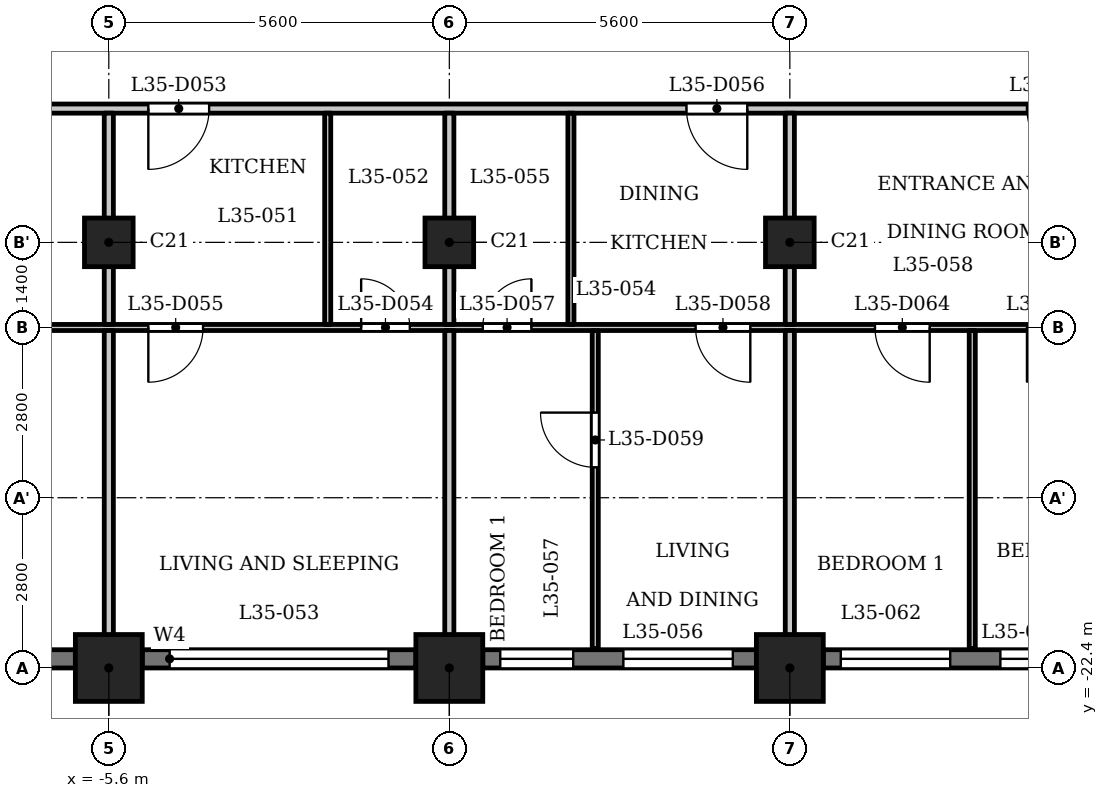
"""IFC4 building model, lengths in metres.
Left out: names, types, materials, properties, quantities, classifications, styles, units other than length and angle.
Written with IfcOpenShell. Run it as: python <this file> out.ifc"""

import sys

from ifc_helpers import new_model, si_unit, direction, frame, frame_2d, origin, origin_2d, place, context, subcontext, project, spatial, rectangle, extrude, element, fill, save


model = new_model("IFC4")
c1 = context("Model", 3, precision=1e-05, world=origin(), true_north=direction((0.0, 1.0)))
c2 = subcontext(c1, "Body", "Model", "MODEL_VIEW")
j1 = project(units=[si_unit("LENGTHUNIT", "METRE"), si_unit("PLANEANGLEUNIT", "RADIAN")], contexts=[c1])
p1 = place(None, origin())
s1 = spatial("IfcSite", under=j1, at=p1, CompositionType="ELEMENT")
p2 = place(p1, origin())
s2 = spatial("IfcBuilding", under=s1, at=p2, CompositionType="ELEMENT")
p3 = place(p2, frame((0.0, 0.0, 139.6)))
s3 = spatial("IfcBuildingStorey", under=s2, at=p3, CompositionType="ELEMENT", Elevation=139.6)
for number, where, z_axis, x_axis in (
    (1, (-5.6, -22.4, 0.0), (0.0, 0.0, 1.0), (1.0, 0.0, 0.0)),
    (2, (0.0, -22.4, 0.0), (0.0, 0.0, 1.0), (1.0, 0.0, 0.0)),
    (3, (5.6, -22.4, 0.0), (0.0, 0.0, 1.0), (1.0, 0.0, 0.0)),
):
    element("IfcColumn", number, at=place(p3, frame(where, z_axis=z_axis, x_axis=x_axis)), inside=s3, PredefinedType="COLUMN", context=c2, shape_type="SweptSolid", body=[
        extrude(rectangle(XDim=1.1, YDim=1.1, at=origin_2d()), origin(), (0.0, 0.0, 1.0), 3.5),
    ])
for number, where, z_axis, x_axis in (
    (4, (-5.6, -15.4, 0.0), (0.0, 0.0, 1.0), (1.0, 0.0, 0.0)),
    (5, (0.0, -15.4, 0.0), (0.0, 0.0, 1.0), (1.0, 0.0, 0.0)),
    (6, (5.6, -15.4, 0.0), (0.0, 0.0, 1.0), (1.0, 0.0, 0.0)),
):
    element("IfcColumn", number, at=place(p3, frame(where, z_axis=z_axis, x_axis=x_axis)), inside=s3, PredefinedType="COLUMN", context=c2, shape_type="SweptSolid", body=[
        extrude(rectangle(XDim=0.8, YDim=0.8, at=origin_2d()), origin(), (0.0, 0.0, 1.0), 3.5),
    ])
p4 = place(p3, frame((-10.65, -22.25, 0.0), z_axis=(0.0, 0.0, 1.0), x_axis=(1.0, 0.0, 0.0)))
e7 = element("IfcWall", 7, at=p4, inside=s3, PredefinedType="SOLIDWALL", context=c2, shape_type="SweptSolid", body=[
    extrude(rectangle(XDim=4.5, YDim=0.3, at=frame_2d((2.25, 0.0))), origin(), (0.0, 0.0, 1.0), 2.45),
])
p5 = place(p4, frame((0.45, 0.0, 1.2)))
e8 = element("IfcOpeningElement", 8, at=p5, cuts=e7, PredefinedType="OPENING", context=c2, shape_type="SweptSolid", body=[
    extrude(rectangle(XDim=3.6, YDim=0.95, at=frame_2d((1.8, 0.475))), frame((0.0, 0.16, 0.0), z_axis=(0.0, -1.0, 0.0), x_axis=(1.0, 0.0, 0.0)), (0.0, 0.0, 1.0), 0.32),
])
p6 = place(p3, frame((-5.05, -22.25, 0.0), z_axis=(0.0, 0.0, 1.0), x_axis=(1.0, 0.0, 0.0)))
e9 = element("IfcWall", 9, at=p6, inside=s3, PredefinedType="SOLIDWALL", context=c2, shape_type="SweptSolid", body=[
    extrude(rectangle(XDim=4.5, YDim=0.3, at=frame_2d((2.25, 0.0))), origin(), (0.0, 0.0, 1.0), 2.45),
])
p7 = place(p6, frame((0.45, 0.0, 1.2)))
e10 = element("IfcOpeningElement", 10, at=p7, cuts=e9, PredefinedType="OPENING", context=c2, shape_type="SweptSolid", body=[
    extrude(rectangle(XDim=3.6, YDim=0.95, at=frame_2d((1.8, 0.475))), frame((0.0, 0.16, 0.0), z_axis=(0.0, -1.0, 0.0), x_axis=(1.0, 0.0, 0.0)), (0.0, 0.0, 1.0), 0.32),
])
p8 = place(p3, frame((0.55, -22.25, 0.0), z_axis=(0.0, 0.0, 1.0), x_axis=(1.0, 0.0, 0.0)))
e11 = element("IfcWall", 11, at=p8, inside=s3, PredefinedType="SOLIDWALL", context=c2, shape_type="SweptSolid", body=[
    extrude(rectangle(XDim=4.5, YDim=0.3, at=frame_2d((2.25, 0.0))), origin(), (0.0, 0.0, 1.0), 2.45),
])
p9 = place(p8, frame((0.288, 0.0, 0.6)))
e12 = element("IfcOpeningElement", 12, at=p9, cuts=e11, PredefinedType="OPENING", context=c2, shape_type="SweptSolid", body=[
    extrude(rectangle(XDim=1.2, YDim=1.55, at=frame_2d((0.6, 0.775))), frame((0.0, 0.16, 0.0), z_axis=(0.0, -1.0, 0.0), x_axis=(1.0, 0.0, 0.0)), (0.0, 0.0, 1.0), 0.32),
])
p10 = place(p8, frame((2.312, 0.0, 0.9)))
e13 = element("IfcOpeningElement", 13, at=p10, cuts=e11, PredefinedType="OPENING", context=c2, shape_type="SweptSolid", body=[
    extrude(rectangle(XDim=1.8, YDim=1.25, at=frame_2d((0.9, 0.625))), frame((0.0, 0.16, 0.0), z_axis=(0.0, -1.0, 0.0), x_axis=(1.0, 0.0, 0.0)), (0.0, 0.0, 1.0), 0.32),
])
p11 = place(p3, frame((6.15, -22.25, 0.0), z_axis=(0.0, 0.0, 1.0), x_axis=(1.0, 0.0, 0.0)))
e14 = element("IfcWall", 14, at=p11, inside=s3, PredefinedType="SOLIDWALL", context=c2, shape_type="SweptSolid", body=[
    extrude(rectangle(XDim=4.5, YDim=0.3, at=frame_2d((2.25, 0.0))), origin(), (0.0, 0.0, 1.0), 2.45),
])
p12 = place(p11, frame((0.288, 0.0, 0.9)))
e15 = element("IfcOpeningElement", 15, at=p12, cuts=e14, PredefinedType="OPENING", context=c2, shape_type="SweptSolid", body=[
    extrude(rectangle(XDim=1.8, YDim=1.25, at=frame_2d((0.9, 0.625))), frame((0.0, 0.16, 0.0), z_axis=(0.0, -1.0, 0.0), x_axis=(1.0, 0.0, 0.0)), (0.0, 0.0, 1.0), 0.32),
])
p13 = place(p11, frame((2.913, 0.0, 0.6)))
e16 = element("IfcOpeningElement", 16, at=p13, cuts=e14, PredefinedType="OPENING", context=c2, shape_type="SweptSolid", body=[
    extrude(rectangle(XDim=1.2, YDim=1.55, at=frame_2d((0.6, 0.775))), frame((0.0, 0.16, 0.0), z_axis=(0.0, -1.0, 0.0), x_axis=(1.0, 0.0, 0.0)), (0.0, 0.0, 1.0), 0.32),
])
p14 = place(p3, frame((-16.725, -16.8, 0.0), z_axis=(0.0, 0.0, 1.0), x_axis=(1.0, 0.0, 0.0)))
e17 = element("IfcWall", 17, at=p14, inside=s3, PredefinedType="PARTITIONING", context=c2, shape_type="SweptSolid", body=[
    extrude(rectangle(XDim=33.45, YDim=0.1, at=frame_2d((16.725, 0.0))), origin(), (0.0, 0.0, 1.0), 3.2),
])
p15 = place(p14, frame((0.575, 0.0, 0.0)))
e18 = element("IfcOpeningElement", 18, at=p15, cuts=e17, PredefinedType="OPENING", context=c2, shape_type="SweptSolid", body=[
    extrude(rectangle(XDim=0.8, YDim=2.1, at=frame_2d((0.4, 1.05))), frame((0.0, 0.06, 0.0), z_axis=(0.0, -1.0, 0.0), x_axis=(1.0, 0.0, 0.0)), (0.0, 0.0, 1.0), 0.12),
])
p16 = place(p14, frame((6.175, 0.0, 0.0)))
e19 = element("IfcOpeningElement", 19, at=p16, cuts=e17, PredefinedType="OPENING", context=c2, shape_type="SweptSolid", body=[
    extrude(rectangle(XDim=0.9, YDim=2.1, at=frame_2d((0.45, 1.05))), frame((0.0, 0.06, 0.0), z_axis=(0.0, -1.0, 0.0), x_axis=(1.0, 0.0, 0.0)), (0.0, 0.0, 1.0), 0.12),
])
p17 = place(p14, frame((15.275, 0.0, 0.0)))
e20 = element("IfcOpeningElement", 20, at=p17, cuts=e17, PredefinedType="OPENING", context=c2, shape_type="SweptSolid", body=[
    extrude(rectangle(XDim=0.8, YDim=2.1, at=frame_2d((0.4, 1.05))), frame((0.0, 0.06, 0.0), z_axis=(0.0, -1.0, 0.0), x_axis=(1.0, 0.0, 0.0)), (0.0, 0.0, 1.0), 0.12),
])
p18 = place(p14, frame((11.775, 0.0, 0.0)))
e21 = element("IfcOpeningElement", 21, at=p18, cuts=e17, PredefinedType="OPENING", context=c2, shape_type="SweptSolid", body=[
    extrude(rectangle(XDim=0.9, YDim=2.1, at=frame_2d((0.45, 1.05))), frame((0.0, 0.06, 0.0), z_axis=(0.0, -1.0, 0.0), x_axis=(1.0, 0.0, 0.0)), (0.0, 0.0, 1.0), 0.12),
])
p19 = place(p14, frame((17.275, 0.0, 0.0)))
e22 = element("IfcOpeningElement", 22, at=p19, cuts=e17, PredefinedType="OPENING", context=c2, shape_type="SweptSolid", body=[
    extrude(rectangle(XDim=0.8, YDim=2.1, at=frame_2d((0.4, 1.05))), frame((0.0, 0.06, 0.0), z_axis=(0.0, -1.0, 0.0), x_axis=(1.0, 0.0, 0.0)), (0.0, 0.0, 1.0), 0.12),
])
p20 = place(p14, frame((20.775, 0.0, 0.0)))
e23 = element("IfcOpeningElement", 23, at=p20, cuts=e17, PredefinedType="OPENING", context=c2, shape_type="SweptSolid", body=[
    extrude(rectangle(XDim=0.9, YDim=2.1, at=frame_2d((0.45, 1.05))), frame((0.0, 0.06, 0.0), z_axis=(0.0, -1.0, 0.0), x_axis=(1.0, 0.0, 0.0)), (0.0, 0.0, 1.0), 0.12),
])
p21 = place(p14, frame((31.575, 0.0, 0.0)))
e24 = element("IfcOpeningElement", 24, at=p21, cuts=e17, PredefinedType="OPENING", context=c2, shape_type="SweptSolid", body=[
    extrude(rectangle(XDim=0.8, YDim=2.1, at=frame_2d((0.4, 1.05))), frame((0.0, 0.06, 0.0), z_axis=(0.0, -1.0, 0.0), x_axis=(1.0, 0.0, 0.0)), (0.0, 0.0, 1.0), 0.12),
])
p22 = place(p14, frame((28.575, 0.0, 0.0)))
e25 = element("IfcOpeningElement", 25, at=p22, cuts=e17, PredefinedType="OPENING", context=c2, shape_type="SweptSolid", body=[
    extrude(rectangle(XDim=0.9, YDim=2.1, at=frame_2d((0.45, 1.05))), frame((0.0, 0.06, 0.0), z_axis=(0.0, -1.0, 0.0), x_axis=(1.0, 0.0, 0.0)), (0.0, 0.0, 1.0), 0.12),
])
p23 = place(p14, frame((23.725, 0.0, 0.0)))
e26 = element("IfcOpeningElement", 26, at=p23, cuts=e17, PredefinedType="OPENING", context=c2, shape_type="SweptSolid", body=[
    extrude(rectangle(XDim=0.9, YDim=2.1, at=frame_2d((0.45, 1.05))), frame((0.0, 0.06, 0.0), z_axis=(0.0, -1.0, 0.0), x_axis=(1.0, 0.0, 0.0)), (0.0, 0.0, 1.0), 0.12),
])
p24 = place(p14, frame((26.225, 0.0, 0.0)))
e27 = element("IfcOpeningElement", 27, at=p24, cuts=e17, PredefinedType="OPENING", context=c2, shape_type="SweptSolid", body=[
    extrude(rectangle(XDim=0.9, YDim=2.1, at=frame_2d((0.45, 1.05))), frame((0.0, 0.06, 0.0), z_axis=(0.0, -1.0, 0.0), x_axis=(1.0, 0.0, 0.0)), (0.0, 0.0, 1.0), 0.12),
])
p25 = place(p3, frame((-17.4, -13.2, 0.0), z_axis=(0.0, 0.0, 1.0), x_axis=(1.0, 0.0, 0.0)))
e28 = element("IfcWall", 28, at=p25, inside=s3, PredefinedType="PARTITIONING", context=c2, shape_type="SweptSolid", body=[
    extrude(rectangle(XDim=34.8, YDim=0.15, at=frame_2d((17.4, 0.0))), origin(), (0.0, 0.0, 1.0), 3.2),
])
p26 = place(p25, frame((0.15, 0.0, 0.0)))
e29 = element("IfcOpeningElement", 29, at=p26, cuts=e28, PredefinedType="OPENING", context=c2, shape_type="SweptSolid", body=[
    extrude(rectangle(XDim=1.0, YDim=2.1, at=frame_2d((0.5, 1.05))), frame((0.0, 0.085, 0.0), z_axis=(0.0, -1.0, 0.0), x_axis=(1.0, 0.0, 0.0)), (0.0, 0.0, 1.0), 0.17),
])
p27 = place(p25, frame((33.55, 0.0, 0.0)))
e30 = element("IfcOpeningElement", 30, at=p27, cuts=e28, PredefinedType="OPENING", context=c2, shape_type="SweptSolid", body=[
    extrude(rectangle(XDim=1.0, YDim=2.1, at=frame_2d((0.5, 1.05))), frame((0.0, 0.085, 0.0), z_axis=(0.0, -1.0, 0.0), x_axis=(1.0, 0.0, 0.0)), (0.0, 0.0, 1.0), 0.17),
])
p28 = place(p25, frame((6.85, 0.0, 0.0)))
e31 = element("IfcOpeningElement", 31, at=p28, cuts=e28, PredefinedType="OPENING", context=c2, shape_type="SweptSolid", body=[
    extrude(rectangle(XDim=1.0, YDim=2.1, at=frame_2d((0.5, 1.05))), frame((0.0, 0.085, 0.0), z_axis=(0.0, -1.0, 0.0), x_axis=(1.0, 0.0, 0.0)), (0.0, 0.0, 1.0), 0.17),
])
p29 = place(p25, frame((12.45, 0.0, 0.0)))
e32 = element("IfcOpeningElement", 32, at=p29, cuts=e28, PredefinedType="OPENING", context=c2, shape_type="SweptSolid", body=[
    extrude(rectangle(XDim=1.0, YDim=2.1, at=frame_2d((0.5, 1.05))), frame((0.0, 0.085, 0.0), z_axis=(0.0, -1.0, 0.0), x_axis=(1.0, 0.0, 0.0)), (0.0, 0.0, 1.0), 0.17),
])
p30 = place(p25, frame((21.3, 0.0, 0.0)))
e33 = element("IfcOpeningElement", 33, at=p30, cuts=e28, PredefinedType="OPENING", context=c2, shape_type="SweptSolid", body=[
    extrude(rectangle(XDim=1.0, YDim=2.1, at=frame_2d((0.5, 1.05))), frame((0.0, 0.085, 0.0), z_axis=(0.0, -1.0, 0.0), x_axis=(1.0, 0.0, 0.0)), (0.0, 0.0, 1.0), 0.17),
])
p31 = place(p25, frame((26.9, 0.0, 0.0)))
e34 = element("IfcOpeningElement", 34, at=p31, cuts=e28, PredefinedType="OPENING", context=c2, shape_type="SweptSolid", body=[
    extrude(rectangle(XDim=1.0, YDim=2.1, at=frame_2d((0.5, 1.05))), frame((0.0, 0.085, 0.0), z_axis=(0.0, -1.0, 0.0), x_axis=(1.0, 0.0, 0.0)), (0.0, 0.0, 1.0), 0.17),
])
p32 = place(p3, frame((-5.6, -22.93, 0.0), z_axis=(0.0, 0.0, 1.0), x_axis=(0.0, 1.0, 0.0)))
e35 = element("IfcWall", 35, at=p32, inside=s3, PredefinedType="PARTITIONING", context=c2, shape_type="SweptSolid", body=[
    extrude(rectangle(XDim=6.08, YDim=0.15, at=frame_2d((3.04, 0.0))), origin(), (0.0, 0.0, 1.0), 3.2),
])
p33 = place(p3, frame((-5.6, -16.75, 0.0), z_axis=(0.0, 0.0, 1.0), x_axis=(0.0, 1.0, 0.0)))
e36 = element("IfcWall", 36, at=p33, inside=s3, PredefinedType="PARTITIONING", context=c2, shape_type="SweptSolid", body=[
    extrude(rectangle(XDim=3.475, YDim=0.15, at=frame_2d((1.738, 0.0))), origin(), (0.0, 0.0, 1.0), 3.2),
])
p34 = place(p3, frame((-2.0, -16.75, 0.0), z_axis=(0.0, 0.0, 1.0), x_axis=(0.0, 1.0, 0.0)))
e37 = element("IfcWall", 37, at=p34, inside=s3, PredefinedType="PARTITIONING", context=c2, shape_type="SweptSolid", body=[
    extrude(rectangle(XDim=3.475, YDim=0.1, at=frame_2d((1.738, 0.0))), origin(), (0.0, 0.0, 1.0), 3.2),
])
p35 = place(p3, frame((0.0, -22.93, 0.0), z_axis=(0.0, 0.0, 1.0), x_axis=(0.0, 1.0, 0.0)))
e38 = element("IfcWall", 38, at=p35, inside=s3, PredefinedType="PARTITIONING", context=c2, shape_type="SweptSolid", body=[
    extrude(rectangle(XDim=6.08, YDim=0.15, at=frame_2d((3.04, 0.0))), origin(), (0.0, 0.0, 1.0), 3.2),
])
p36 = place(p3, frame((0.0, -16.75, 0.0), z_axis=(0.0, 0.0, 1.0), x_axis=(0.0, 1.0, 0.0)))
e39 = element("IfcWall", 39, at=p36, inside=s3, PredefinedType="PARTITIONING", context=c2, shape_type="SweptSolid", body=[
    extrude(rectangle(XDim=3.475, YDim=0.15, at=frame_2d((1.738, 0.0))), origin(), (0.0, 0.0, 1.0), 3.2),
])
p37 = place(p3, frame((2.0, -16.75, 0.0), z_axis=(0.0, 0.0, 1.0), x_axis=(0.0, 1.0, 0.0)))
e40 = element("IfcWall", 40, at=p37, inside=s3, PredefinedType="PARTITIONING", context=c2, shape_type="SweptSolid", body=[
    extrude(rectangle(XDim=3.475, YDim=0.1, at=frame_2d((1.738, 0.0))), origin(), (0.0, 0.0, 1.0), 3.2),
])
p38 = place(p3, frame((2.4, -22.08, 0.0), z_axis=(0.0, 0.0, 1.0), x_axis=(0.0, 1.0, 0.0)))
e41 = element("IfcWall", 41, at=p38, inside=s3, PredefinedType="PARTITIONING", context=c2, shape_type="SweptSolid", body=[
    extrude(rectangle(XDim=5.23, YDim=0.1, at=frame_2d((2.615, 0.0))), origin(), (0.0, 0.0, 1.0), 3.2),
])
p39 = place(p38, frame((2.98, 0.0, 0.0)))
e42 = element("IfcOpeningElement", 42, at=p39, cuts=e41, PredefinedType="OPENING", context=c2, shape_type="SweptSolid", body=[
    extrude(rectangle(XDim=0.9, YDim=2.1, at=frame_2d((0.45, 1.05))), frame((0.0, 0.06, 0.0), z_axis=(0.0, -1.0, 0.0), x_axis=(1.0, 0.0, 0.0)), (0.0, 0.0, 1.0), 0.12),
])
p40 = place(p3, frame((5.6, -22.93, 0.0), z_axis=(0.0, 0.0, 1.0), x_axis=(0.0, 1.0, 0.0)))
e43 = element("IfcWall", 43, at=p40, inside=s3, PredefinedType="PARTITIONING", context=c2, shape_type="SweptSolid", body=[
    extrude(rectangle(XDim=6.08, YDim=0.15, at=frame_2d((3.04, 0.0))), origin(), (0.0, 0.0, 1.0), 3.2),
])
p41 = place(p3, frame((5.6, -16.75, 0.0), z_axis=(0.0, 0.0, 1.0), x_axis=(0.0, 1.0, 0.0)))
e44 = element("IfcWall", 44, at=p41, inside=s3, PredefinedType="PARTITIONING", context=c2, shape_type="SweptSolid", body=[
    extrude(rectangle(XDim=3.475, YDim=0.15, at=frame_2d((1.738, 0.0))), origin(), (0.0, 0.0, 1.0), 3.2),
])
p42 = place(p3, frame((8.6, -22.08, 0.0), z_axis=(0.0, 0.0, 1.0), x_axis=(0.0, 1.0, 0.0)))
e45 = element("IfcWall", 45, at=p42, inside=s3, PredefinedType="PARTITIONING", context=c2, shape_type="SweptSolid", body=[
    extrude(rectangle(XDim=5.23, YDim=0.1, at=frame_2d((2.615, 0.0))), origin(), (0.0, 0.0, 1.0), 3.2),
])
p43 = place(p29, origin())
e46 = element("IfcDoor", 46, at=p43, inside=s3, OperationType="SINGLE_SWING_LEFT", PredefinedType="DOOR", context=c2, shape_type="SweptSolid", body=[
    extrude(rectangle(XDim=1.0, YDim=2.1, at=frame_2d((0.5, 1.05))), frame((0.0, 0.025, 0.0), z_axis=(0.0, -1.0, 0.0), x_axis=(1.0, 0.0, 0.0)), (0.0, 0.0, 1.0), 0.05),
])
fill(e32, e46)
p44 = place(p17, origin())
e47 = element("IfcDoor", 47, at=p44, inside=s3, OperationType="SINGLE_SWING_RIGHT", PredefinedType="DOOR", context=c2, shape_type="SweptSolid", body=[
    extrude(rectangle(XDim=0.8, YDim=2.1, at=frame_2d((0.4, 1.05))), frame((0.0, 0.025, 0.0), z_axis=(0.0, -1.0, 0.0), x_axis=(1.0, 0.0, 0.0)), (0.0, 0.0, 1.0), 0.05),
])
fill(e20, e47)
p45 = place(p18, origin())
e48 = element("IfcDoor", 48, at=p45, inside=s3, OperationType="SINGLE_SWING_LEFT", PredefinedType="DOOR", context=c2, shape_type="SweptSolid", body=[
    extrude(rectangle(XDim=0.9, YDim=2.1, at=frame_2d((0.45, 1.05))), frame((0.0, 0.025, 0.0), z_axis=(0.0, -1.0, 0.0), x_axis=(1.0, 0.0, 0.0)), (0.0, 0.0, 1.0), 0.05),
])
fill(e21, e48)
p46 = place(p30, origin())
e49 = element("IfcDoor", 49, at=p46, inside=s3, OperationType="SINGLE_SWING_RIGHT", PredefinedType="DOOR", context=c2, shape_type="SweptSolid", body=[
    extrude(rectangle(XDim=1.0, YDim=2.1, at=frame_2d((0.5, 1.05))), frame((0.0, 0.025, 0.0), z_axis=(0.0, -1.0, 0.0), x_axis=(1.0, 0.0, 0.0)), (0.0, 0.0, 1.0), 0.05),
])
fill(e33, e49)
p47 = place(p19, origin())
e50 = element("IfcDoor", 50, at=p47, inside=s3, OperationType="SINGLE_SWING_LEFT", PredefinedType="DOOR", context=c2, shape_type="SweptSolid", body=[
    extrude(rectangle(XDim=0.8, YDim=2.1, at=frame_2d((0.4, 1.05))), frame((0.0, 0.025, 0.0), z_axis=(0.0, -1.0, 0.0), x_axis=(1.0, 0.0, 0.0)), (0.0, 0.0, 1.0), 0.05),
])
fill(e22, e50)
p48 = place(p20, origin())
e51 = element("IfcDoor", 51, at=p48, inside=s3, OperationType="SINGLE_SWING_RIGHT", PredefinedType="DOOR", context=c2, shape_type="SweptSolid", body=[
    extrude(rectangle(XDim=0.9, YDim=2.1, at=frame_2d((0.45, 1.05))), frame((0.0, 0.025, 0.0), z_axis=(0.0, -1.0, 0.0), x_axis=(1.0, 0.0, 0.0)), (0.0, 0.0, 1.0), 0.05),
])
fill(e23, e51)
p49 = place(p39, origin())
e52 = element("IfcDoor", 52, at=p49, inside=s3, OperationType="SINGLE_SWING_LEFT", PredefinedType="DOOR", context=c2, shape_type="SweptSolid", body=[
    extrude(rectangle(XDim=0.9, YDim=2.1, at=frame_2d((0.45, 1.05))), frame((0.0, 0.025, 0.0), z_axis=(0.0, -1.0, 0.0), x_axis=(1.0, 0.0, 0.0)), (0.0, 0.0, 1.0), 0.05),
])
fill(e42, e52)
p50 = place(p31, origin())
e53 = element("IfcDoor", 53, at=p50, inside=s3, OperationType="SINGLE_SWING_RIGHT", PredefinedType="DOOR", context=c2, shape_type="SweptSolid", body=[
    extrude(rectangle(XDim=1.0, YDim=2.1, at=frame_2d((0.5, 1.05))), frame((0.0, 0.025, 0.0), z_axis=(0.0, -1.0, 0.0), x_axis=(1.0, 0.0, 0.0)), (0.0, 0.0, 1.0), 0.05),
])
fill(e34, e53)
p51 = place(p23, origin())
e54 = element("IfcDoor", 54, at=p51, inside=s3, OperationType="SINGLE_SWING_RIGHT", PredefinedType="DOOR", context=c2, shape_type="SweptSolid", body=[
    extrude(rectangle(XDim=0.9, YDim=2.1, at=frame_2d((0.45, 1.05))), frame((0.0, 0.025, 0.0), z_axis=(0.0, -1.0, 0.0), x_axis=(1.0, 0.0, 0.0)), (0.0, 0.0, 1.0), 0.05),
])
fill(e26, e54)
p52 = place(p24, origin())
e55 = element("IfcDoor", 55, at=p52, inside=s3, OperationType="SINGLE_SWING_LEFT", PredefinedType="DOOR", context=c2, shape_type="SweptSolid", body=[
    extrude(rectangle(XDim=0.9, YDim=2.1, at=frame_2d((0.45, 1.05))), frame((0.0, 0.025, 0.0), z_axis=(0.0, -1.0, 0.0), x_axis=(1.0, 0.0, 0.0)), (0.0, 0.0, 1.0), 0.05),
])
fill(e27, e55)
p53 = place(p7, origin())
e56 = element("IfcWindow", 56, at=p53, inside=s3, PartitioningType="SINGLE_PANEL", PredefinedType="WINDOW", context=c2, shape_type="SweptSolid", body=[
    extrude(rectangle(XDim=3.6, YDim=0.95, at=frame_2d((1.8, 0.475))), frame((0.0, 0.03, 0.0), z_axis=(0.0, -1.0, 0.0), x_axis=(1.0, 0.0, 0.0)), (0.0, 0.0, 1.0), 0.06),
])
fill(e10, e56)
p54 = place(p9, origin())
e57 = element("IfcWindow", 57, at=p54, inside=s3, PartitioningType="SINGLE_PANEL", PredefinedType="WINDOW", context=c2, shape_type="SweptSolid", body=[
    extrude(rectangle(XDim=1.2, YDim=1.55, at=frame_2d((0.6, 0.775))), frame((0.0, 0.03, 0.0), z_axis=(0.0, -1.0, 0.0), x_axis=(1.0, 0.0, 0.0)), (0.0, 0.0, 1.0), 0.06),
])
fill(e12, e57)
p55 = place(p10, origin())
e58 = element("IfcWindow", 58, at=p55, inside=s3, PartitioningType="SINGLE_PANEL", PredefinedType="WINDOW", context=c2, shape_type="SweptSolid", body=[
    extrude(rectangle(XDim=1.8, YDim=1.25, at=frame_2d((0.9, 0.625))), frame((0.0, 0.03, 0.0), z_axis=(0.0, -1.0, 0.0), x_axis=(1.0, 0.0, 0.0)), (0.0, 0.0, 1.0), 0.06),
])
fill(e13, e58)
p56 = place(p12, origin())
e59 = element("IfcWindow", 59, at=p56, inside=s3, PartitioningType="SINGLE_PANEL", PredefinedType="WINDOW", context=c2, shape_type="SweptSolid", body=[
    extrude(rectangle(XDim=1.8, YDim=1.25, at=frame_2d((0.9, 0.625))), frame((0.0, 0.03, 0.0), z_axis=(0.0, -1.0, 0.0), x_axis=(1.0, 0.0, 0.0)), (0.0, 0.0, 1.0), 0.06),
])
fill(e15, e59)
p57 = place(p13, origin())
e60 = element("IfcWindow", 60, at=p57, inside=s3, PartitioningType="SINGLE_PANEL", PredefinedType="WINDOW", context=c2, shape_type="SweptSolid", body=[
    extrude(rectangle(XDim=1.2, YDim=1.55, at=frame_2d((0.6, 0.775))), frame((0.0, 0.03, 0.0), z_axis=(0.0, -1.0, 0.0), x_axis=(1.0, 0.0, 0.0)), (0.0, 0.0, 1.0), 0.06),
])
fill(e16, e60)
save(model, sys.argv[1])
